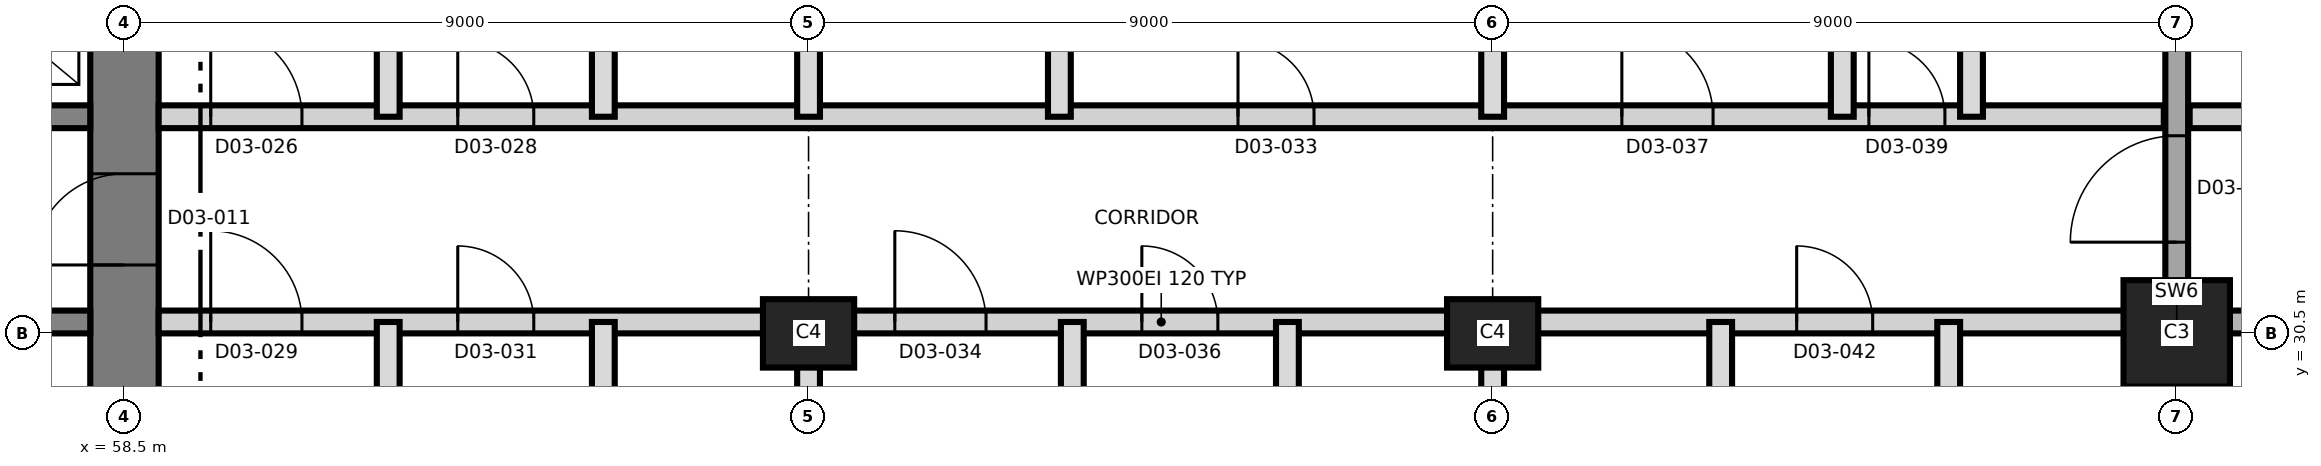
"""IFC4 building model, lengths in metres.
Left out: names, types, materials, properties, quantities, classifications, styles, units other than length and angle.
Written with IfcOpenShell. Run it as: python <this file> out.ifc"""

import sys

from ifc_helpers import new_model, si_unit, direction, frame, frame_2d, origin, origin_2d, place, context, subcontext, project, spatial, rectangle, extrude, element, fill, save


model = new_model("IFC4")
c1 = context("Model", 3, precision=1e-05, world=origin(), true_north=direction((0.0, 1.0)))
c2 = subcontext(c1, "Body", "Model", "MODEL_VIEW")
j1 = project(units=[si_unit("LENGTHUNIT", "METRE"), si_unit("PLANEANGLEUNIT", "RADIAN")], contexts=[c1])
p1 = place(None, origin())
s1 = spatial("IfcSite", under=j1, at=p1, CompositionType="ELEMENT")
p2 = place(p1, origin())
s2 = spatial("IfcBuilding", under=s1, at=p2, CompositionType="ELEMENT")
p3 = place(p2, frame((0.0, 0.0, 55.7)))
s3 = spatial("IfcBuildingStorey", under=s2, at=p3, CompositionType="ELEMENT", Elevation=55.7)
p4 = place(p3, frame((58.5, 21.05, 0.0), z_axis=(0.0, 0.0, 1.0), x_axis=(0.0, 1.0, 0.0)))
e1 = element("IfcWall", 1, at=p4, inside=s3, PredefinedType="SHEAR", context=c2, shape_type="SweptSolid", body=[
    extrude(rectangle(XDim=18.9, YDim=0.9, at=frame_2d((9.45, 0.0))), origin(), (0.0, 0.0, 1.0), 3.7),
])
p5 = place(p4, frame((10.35, 0.0, 0.0)))
e2 = element("IfcOpeningElement", 2, at=p5, cuts=e1, PredefinedType="OPENING", context=c2, shape_type="SweptSolid", body=[
    extrude(rectangle(XDim=1.2, YDim=2.1, at=frame_2d((0.6, 1.05))), frame((0.0, 0.46, 0.0), z_axis=(0.0, -1.0, 0.0), x_axis=(1.0, 0.0, 0.0)), (0.0, 0.0, 1.0), 0.92),
])
p6 = place(p3, frame((31.95, 30.65, 0.0), z_axis=(0.0, 0.0, 1.0), x_axis=(1.0, 0.0, 0.0)))
e3 = element("IfcWall", 3, at=p6, inside=s3, PredefinedType="SHEAR", context=c2, shape_type="SweptSolid", body=[
    extrude(rectangle(XDim=26.1, YDim=0.3, at=frame_2d((13.05, 0.0))), origin(), (0.0, 0.0, 1.0), 3.7),
])
p7 = place(p6, frame((24.55, 0.0, 0.0)))
e4 = element("IfcOpeningElement", 4, at=p7, cuts=e3, PredefinedType="OPENING", context=c2, shape_type="SweptSolid", body=[
    extrude(rectangle(XDim=1.0, YDim=2.1, at=frame_2d((0.5, 1.05))), frame((0.0, 0.16, 0.0), z_axis=(0.0, -1.0, 0.0), x_axis=(1.0, 0.0, 0.0)), (0.0, 0.0, 1.0), 0.32),
])
p8 = place(p6, frame((11.35, 0.0, 0.0)))
e5 = element("IfcOpeningElement", 5, at=p8, cuts=e3, PredefinedType="OPENING", context=c2, shape_type="SweptSolid", body=[
    extrude(rectangle(XDim=1.0, YDim=2.1, at=frame_2d((0.5, 1.05))), frame((0.0, 0.16, 0.0), z_axis=(0.0, -1.0, 0.0), x_axis=(1.0, 0.0, 0.0)), (0.0, 0.0, 1.0), 0.32),
])
p9 = place(p3, frame((31.95, 33.35, 0.0), z_axis=(0.0, 0.0, 1.0), x_axis=(1.0, 0.0, 0.0)))
e6 = element("IfcWall", 6, at=p9, inside=s3, PredefinedType="SHEAR", context=c2, shape_type="SweptSolid", body=[
    extrude(rectangle(XDim=26.1, YDim=0.3, at=frame_2d((13.05, 0.0))), origin(), (0.0, 0.0, 1.0), 3.7),
])
p10 = place(p9, frame((13.125, 0.0, 0.0)))
e7 = element("IfcOpeningElement", 7, at=p10, cuts=e6, PredefinedType="OPENING", context=c2, shape_type="SweptSolid", body=[
    extrude(rectangle(XDim=1.4, YDim=2.1, at=frame_2d((0.7, 1.05))), frame((0.0, 0.16, 0.0), z_axis=(0.0, -1.0, 0.0), x_axis=(1.0, 0.0, 0.0)), (0.0, 0.0, 1.0), 0.32),
])
p11 = place(p9, frame((5.175, 0.0, 0.0)))
e8 = element("IfcOpeningElement", 8, at=p11, cuts=e6, PredefinedType="OPENING", context=c2, shape_type="SweptSolid", body=[
    extrude(rectangle(XDim=1.2, YDim=2.1, at=frame_2d((0.6, 1.05))), frame((0.0, 0.16, 0.0), z_axis=(0.0, -1.0, 0.0), x_axis=(1.0, 0.0, 0.0)), (0.0, 0.0, 1.0), 0.32),
])
p12 = place(p9, frame((19.725, 0.0, 0.0)))
e9 = element("IfcOpeningElement", 9, at=p12, cuts=e6, PredefinedType="OPENING", context=c2, shape_type="SweptSolid", body=[
    extrude(rectangle(XDim=1.2, YDim=2.1, at=frame_2d((0.6, 1.05))), frame((0.0, 0.16, 0.0), z_axis=(0.0, -1.0, 0.0), x_axis=(1.0, 0.0, 0.0)), (0.0, 0.0, 1.0), 0.32),
])
for number, where, z_axis, x_axis in (
    (10, (67.5, 30.5, 0.0), (0.0, 0.0, 1.0), (1.0, 0.0, 0.0)),
    (11, (76.5, 30.5, 0.0), (0.0, 0.0, 1.0), (1.0, 0.0, 0.0)),
):
    element("IfcColumn", number, at=place(p3, frame(where, z_axis=z_axis, x_axis=x_axis)), inside=s3, PredefinedType="COLUMN", context=c2, shape_type="SweptSolid", body=[
        extrude(rectangle(XDim=1.2, YDim=0.9, at=origin_2d()), origin(), (0.0, 0.0, 1.0), 3.7),
    ])
p13 = place(p3, frame((85.5, 30.5, 0.0), z_axis=(0.0, 0.0, 1.0), x_axis=(1.0, 0.0, 0.0)))
e12 = element("IfcColumn", 12, at=p13, inside=s3, PredefinedType="COLUMN", context=c2, shape_type="SweptSolid", body=[
    extrude(rectangle(XDim=1.4, YDim=1.4, at=origin_2d()), origin(), (0.0, 0.0, 1.0), 3.7),
])
p14 = place(p3, frame((85.5, 19.705, 0.0), z_axis=(0.0, 0.0, 1.0), x_axis=(0.0, 1.0, 0.0)))
e13 = element("IfcWall", 13, at=p14, inside=s3, PredefinedType="SHEAR", context=c2, shape_type="SweptSolid", body=[
    extrude(rectangle(XDim=21.59, YDim=0.3, at=frame_2d((10.795, 0.0))), origin(), (0.0, 0.0, 1.0), 3.7),
])
p15 = place(p14, frame((11.995, 0.0, 0.0)))
e14 = element("IfcOpeningElement", 14, at=p15, cuts=e13, PredefinedType="OPENING", context=c2, shape_type="SweptSolid", body=[
    extrude(rectangle(XDim=1.4, YDim=2.1, at=frame_2d((0.7, 1.05))), frame((0.0, 0.16, 0.0), z_axis=(0.0, -1.0, 0.0), x_axis=(1.0, 0.0, 0.0)), (0.0, 0.0, 1.0), 0.32),
])
p16 = place(p3, frame((58.95, 30.65, 0.0), z_axis=(0.0, 0.0, 1.0), x_axis=(1.0, 0.0, 0.0)))
e15 = element("IfcWall", 15, at=p16, inside=s3, PredefinedType="PARTITIONING", context=c2, shape_type="SweptSolid", body=[
    extrude(rectangle(XDim=26.38, YDim=0.3, at=frame_2d((13.19, 0.0))), origin(), (0.0, 0.0, 1.0), 3.4),
])
p17 = place(p16, frame((0.685, 0.0, 0.0)))
e16 = element("IfcOpeningElement", 16, at=p17, cuts=e15, PredefinedType="OPENING", context=c2, shape_type="SweptSolid", body=[
    extrude(rectangle(XDim=1.2, YDim=2.1, at=frame_2d((0.6, 1.05))), frame((0.0, 0.16, 0.0), z_axis=(0.0, -1.0, 0.0), x_axis=(1.0, 0.0, 0.0)), (0.0, 0.0, 1.0), 0.32),
])
p18 = place(p16, frame((3.935, 0.0, 0.0)))
e17 = element("IfcOpeningElement", 17, at=p18, cuts=e15, PredefinedType="OPENING", context=c2, shape_type="SweptSolid", body=[
    extrude(rectangle(XDim=1.0, YDim=2.1, at=frame_2d((0.5, 1.05))), frame((0.0, 0.16, 0.0), z_axis=(0.0, -1.0, 0.0), x_axis=(1.0, 0.0, 0.0)), (0.0, 0.0, 1.0), 0.32),
])
p19 = place(p16, frame((9.685, 0.0, 0.0)))
e18 = element("IfcOpeningElement", 18, at=p19, cuts=e15, PredefinedType="OPENING", context=c2, shape_type="SweptSolid", body=[
    extrude(rectangle(XDim=1.2, YDim=2.1, at=frame_2d((0.6, 1.05))), frame((0.0, 0.16, 0.0), z_axis=(0.0, -1.0, 0.0), x_axis=(1.0, 0.0, 0.0)), (0.0, 0.0, 1.0), 0.32),
])
p20 = place(p16, frame((12.935, 0.0, 0.0)))
e19 = element("IfcOpeningElement", 19, at=p20, cuts=e15, PredefinedType="OPENING", context=c2, shape_type="SweptSolid", body=[
    extrude(rectangle(XDim=1.0, YDim=2.1, at=frame_2d((0.5, 1.05))), frame((0.0, 0.16, 0.0), z_axis=(0.0, -1.0, 0.0), x_axis=(1.0, 0.0, 0.0)), (0.0, 0.0, 1.0), 0.32),
])
p21 = place(p16, frame((21.55, 0.0, 0.0)))
e20 = element("IfcOpeningElement", 20, at=p21, cuts=e15, PredefinedType="OPENING", context=c2, shape_type="SweptSolid", body=[
    extrude(rectangle(XDim=1.0, YDim=2.4, at=frame_2d((0.5, 1.2))), frame((0.0, 0.16, 0.0), z_axis=(0.0, -1.0, 0.0), x_axis=(1.0, 0.0, 0.0)), (0.0, 0.0, 1.0), 0.32),
])
p22 = place(p3, frame((85.67, 30.65, 0.0), z_axis=(0.0, 0.0, 1.0), x_axis=(1.0, 0.0, 0.0)))
e21 = element("IfcWall", 21, at=p22, inside=s3, PredefinedType="SHEAR", context=c2, shape_type="SweptSolid", body=[
    extrude(rectangle(XDim=9.58, YDim=0.3, at=frame_2d((4.79, 0.0))), origin(), (0.0, 0.0, 1.0), 3.4),
])
p23 = place(p22, frame((2.08, 0.0, 0.0)))
e22 = element("IfcOpeningElement", 22, at=p23, cuts=e21, PredefinedType="OPENING", context=c2, shape_type="SweptSolid", body=[
    extrude(rectangle(XDim=1.2, YDim=2.1, at=frame_2d((0.6, 1.05))), frame((0.0, 0.16, 0.0), z_axis=(0.0, -1.0, 0.0), x_axis=(1.0, 0.0, 0.0)), (0.0, 0.0, 1.0), 0.32),
])
p24 = place(p22, frame((5.63, 0.0, 0.0)))
e23 = element("IfcOpeningElement", 23, at=p24, cuts=e21, PredefinedType="OPENING", context=c2, shape_type="SweptSolid", body=[
    extrude(rectangle(XDim=1.0, YDim=2.1, at=frame_2d((0.5, 1.05))), frame((0.0, 0.16, 0.0), z_axis=(0.0, -1.0, 0.0), x_axis=(1.0, 0.0, 0.0)), (0.0, 0.0, 1.0), 0.32),
])
p25 = place(p3, frame((58.95, 33.35, 0.0), z_axis=(0.0, 0.0, 1.0), x_axis=(1.0, 0.0, 0.0)))
e24 = element("IfcWall", 24, at=p25, inside=s3, PredefinedType="PARTITIONING", context=c2, shape_type="SweptSolid", body=[
    extrude(rectangle(XDim=26.38, YDim=0.3, at=frame_2d((13.19, 0.0))), origin(), (0.0, 0.0, 1.0), 3.4),
])
p26 = place(p25, frame((0.685, 0.0, 0.0)))
e25 = element("IfcOpeningElement", 25, at=p26, cuts=e24, PredefinedType="OPENING", context=c2, shape_type="SweptSolid", body=[
    extrude(rectangle(XDim=1.2, YDim=2.1, at=frame_2d((0.6, 1.05))), frame((0.0, 0.16, 0.0), z_axis=(0.0, -1.0, 0.0), x_axis=(1.0, 0.0, 0.0)), (0.0, 0.0, 1.0), 0.32),
])
p27 = place(p25, frame((3.935, 0.0, 0.0)))
e26 = element("IfcOpeningElement", 26, at=p27, cuts=e24, PredefinedType="OPENING", context=c2, shape_type="SweptSolid", body=[
    extrude(rectangle(XDim=1.0, YDim=2.1, at=frame_2d((0.5, 1.05))), frame((0.0, 0.16, 0.0), z_axis=(0.0, -1.0, 0.0), x_axis=(1.0, 0.0, 0.0)), (0.0, 0.0, 1.0), 0.32),
])
p28 = place(p25, frame((14.2, 0.0, 0.0)))
e27 = element("IfcOpeningElement", 27, at=p28, cuts=e24, PredefinedType="OPENING", context=c2, shape_type="SweptSolid", body=[
    extrude(rectangle(XDim=1.0, YDim=2.4, at=frame_2d((0.5, 1.2))), frame((0.0, 0.16, 0.0), z_axis=(0.0, -1.0, 0.0), x_axis=(1.0, 0.0, 0.0)), (0.0, 0.0, 1.0), 0.32),
])
p29 = place(p25, frame((19.25, 0.0, 0.0)))
e28 = element("IfcOpeningElement", 28, at=p29, cuts=e24, PredefinedType="OPENING", context=c2, shape_type="SweptSolid", body=[
    extrude(rectangle(XDim=1.2, YDim=2.1, at=frame_2d((0.6, 1.05))), frame((0.0, 0.16, 0.0), z_axis=(0.0, -1.0, 0.0), x_axis=(1.0, 0.0, 0.0)), (0.0, 0.0, 1.0), 0.32),
])
p30 = place(p25, frame((22.5, 0.0, 0.0)))
e29 = element("IfcOpeningElement", 29, at=p30, cuts=e24, PredefinedType="OPENING", context=c2, shape_type="SweptSolid", body=[
    extrude(rectangle(XDim=1.0, YDim=2.1, at=frame_2d((0.5, 1.05))), frame((0.0, 0.16, 0.0), z_axis=(0.0, -1.0, 0.0), x_axis=(1.0, 0.0, 0.0)), (0.0, 0.0, 1.0), 0.32),
])
p31 = place(p3, frame((85.67, 33.35, 0.0), z_axis=(0.0, 0.0, 1.0), x_axis=(1.0, 0.0, 0.0)))
e30 = element("IfcWall", 30, at=p31, inside=s3, PredefinedType="PARTITIONING", context=c2, shape_type="SweptSolid", body=[
    extrude(rectangle(XDim=9.58, YDim=0.3, at=frame_2d((4.79, 0.0))), origin(), (0.0, 0.0, 1.0), 3.4),
])
p32 = place(p31, frame((1.83, 0.0, 0.0)))
e31 = element("IfcOpeningElement", 31, at=p32, cuts=e30, PredefinedType="OPENING", context=c2, shape_type="SweptSolid", body=[
    extrude(rectangle(XDim=1.0, YDim=2.1, at=frame_2d((0.5, 1.05))), frame((0.0, 0.16, 0.0), z_axis=(0.0, -1.0, 0.0), x_axis=(1.0, 0.0, 0.0)), (0.0, 0.0, 1.0), 0.32),
])
p33 = place(p31, frame((5.63, 0.0, 0.0)))
e32 = element("IfcOpeningElement", 32, at=p33, cuts=e30, PredefinedType="OPENING", context=c2, shape_type="SweptSolid", body=[
    extrude(rectangle(XDim=1.0, YDim=2.1, at=frame_2d((0.5, 1.05))), frame((0.0, 0.16, 0.0), z_axis=(0.0, -1.0, 0.0), x_axis=(1.0, 0.0, 0.0)), (0.0, 0.0, 1.0), 0.32),
])
p34 = place(p3, frame((61.97, 19.705, 0.0), z_axis=(0.0, 0.0, 1.0), x_axis=(0.0, 1.0, 0.0)))
e33 = element("IfcWall", 33, at=p34, inside=s3, PredefinedType="PARTITIONING", context=c2, shape_type="SweptSolid", body=[
    extrude(rectangle(XDim=10.945, YDim=0.3, at=frame_2d((5.472, 0.0))), origin(), (0.0, 0.0, 1.0), 3.4),
])
p35 = place(p3, frame((61.97, 33.35, 0.0), z_axis=(0.0, 0.0, 1.0), x_axis=(0.0, 1.0, 0.0)))
e34 = element("IfcWall", 34, at=p35, inside=s3, PredefinedType="PARTITIONING", context=c2, shape_type="SweptSolid", body=[
    extrude(rectangle(XDim=8.125, YDim=0.3, at=frame_2d((4.062, 0.0))), origin(), (0.0, 0.0, 1.0), 3.4),
])
for number, where, z_axis, x_axis in (
    (35, (64.8, 27.45, 0.0), (0.0, 0.0, 1.0), (0.0, 1.0, 0.0)),
    (36, (64.8, 33.35, 0.0), (0.0, 0.0, 1.0), (0.0, 1.0, 0.0)),
):
    element("IfcWall", number, at=place(p3, frame(where, z_axis=z_axis, x_axis=x_axis)), inside=s3, PredefinedType="PARTITIONING", context=c2, shape_type="SweptSolid", body=[
        extrude(rectangle(XDim=3.2, YDim=0.3, at=frame_2d((1.6, 0.0))), origin(), (0.0, 0.0, 1.0), 3.4),
    ])
p36 = place(p3, frame((67.5, 19.705, 0.0), z_axis=(0.0, 0.0, 1.0), x_axis=(0.0, 1.0, 0.0)))
e37 = element("IfcWall", 37, at=p36, inside=s3, PredefinedType="PARTITIONING", context=c2, shape_type="SweptSolid", body=[
    extrude(rectangle(XDim=10.945, YDim=0.3, at=frame_2d((5.472, 0.0))), origin(), (0.0, 0.0, 1.0), 3.4),
])
p37 = place(p3, frame((67.5, 33.35, 0.0), z_axis=(0.0, 0.0, 1.0), x_axis=(0.0, 1.0, 0.0)))
e38 = element("IfcWall", 38, at=p37, inside=s3, PredefinedType="PARTITIONING", context=c2, shape_type="SweptSolid", body=[
    extrude(rectangle(XDim=8.125, YDim=0.3, at=frame_2d((4.062, 0.0))), origin(), (0.0, 0.0, 1.0), 3.4),
])
p38 = place(p3, frame((70.8, 33.35, 0.0), z_axis=(0.0, 0.0, 1.0), x_axis=(0.0, 1.0, 0.0)))
e39 = element("IfcWall", 39, at=p38, inside=s3, PredefinedType="PARTITIONING", context=c2, shape_type="SweptSolid", body=[
    extrude(rectangle(XDim=3.5, YDim=0.3, at=frame_2d((1.75, 0.0))), origin(), (0.0, 0.0, 1.0), 3.4),
])
p39 = place(p3, frame((70.97, 19.705, 0.0), z_axis=(0.0, 0.0, 1.0), x_axis=(0.0, 1.0, 0.0)))
e40 = element("IfcWall", 40, at=p39, inside=s3, PredefinedType="PARTITIONING", context=c2, shape_type="SweptSolid", body=[
    extrude(rectangle(XDim=10.945, YDim=0.3, at=frame_2d((5.472, 0.0))), origin(), (0.0, 0.0, 1.0), 3.4),
])
p40 = place(p3, frame((73.8, 27.45, 0.0), z_axis=(0.0, 0.0, 1.0), x_axis=(0.0, 1.0, 0.0)))
e41 = element("IfcWall", 41, at=p40, inside=s3, PredefinedType="PARTITIONING", context=c2, shape_type="SweptSolid", body=[
    extrude(rectangle(XDim=3.2, YDim=0.3, at=frame_2d((1.6, 0.0))), origin(), (0.0, 0.0, 1.0), 3.4),
])
p41 = place(p3, frame((76.5, 19.705, 0.0), z_axis=(0.0, 0.0, 1.0), x_axis=(0.0, 1.0, 0.0)))
e42 = element("IfcWall", 42, at=p41, inside=s3, PredefinedType="PARTITIONING", context=c2, shape_type="SweptSolid", body=[
    extrude(rectangle(XDim=10.945, YDim=0.3, at=frame_2d((5.472, 0.0))), origin(), (0.0, 0.0, 1.0), 3.4),
])
p42 = place(p3, frame((76.5, 33.35, 0.0), z_axis=(0.0, 0.0, 1.0), x_axis=(0.0, 1.0, 0.0)))
e43 = element("IfcWall", 43, at=p42, inside=s3, PredefinedType="PARTITIONING", context=c2, shape_type="SweptSolid", body=[
    extrude(rectangle(XDim=8.125, YDim=0.3, at=frame_2d((4.062, 0.0))), origin(), (0.0, 0.0, 1.0), 3.4),
])
p43 = place(p3, frame((79.5, 27.35, 0.0), z_axis=(0.0, 0.0, 1.0), x_axis=(0.0, 1.0, 0.0)))
e44 = element("IfcWall", 44, at=p43, inside=s3, PredefinedType="PARTITIONING", context=c2, shape_type="SweptSolid", body=[
    extrude(rectangle(XDim=3.3, YDim=0.3, at=frame_2d((1.65, 0.0))), origin(), (0.0, 0.0, 1.0), 3.4),
])
p44 = place(p3, frame((81.1, 33.35, 0.0), z_axis=(0.0, 0.0, 1.0), x_axis=(0.0, 1.0, 0.0)))
e45 = element("IfcWall", 45, at=p44, inside=s3, PredefinedType="PARTITIONING", context=c2, shape_type="SweptSolid", body=[
    extrude(rectangle(XDim=8.125, YDim=0.3, at=frame_2d((4.062, 0.0))), origin(), (0.0, 0.0, 1.0), 3.4),
])
p45 = place(p3, frame((82.5, 27.35, 0.0), z_axis=(0.0, 0.0, 1.0), x_axis=(0.0, 1.0, 0.0)))
e46 = element("IfcWall", 46, at=p45, inside=s3, PredefinedType="PARTITIONING", context=c2, shape_type="SweptSolid", body=[
    extrude(rectangle(XDim=3.3, YDim=0.3, at=frame_2d((1.65, 0.0))), origin(), (0.0, 0.0, 1.0), 3.4),
])
p46 = place(p3, frame((82.8, 33.35, 0.0), z_axis=(0.0, 0.0, 1.0), x_axis=(0.0, 1.0, 0.0)))
e47 = element("IfcWall", 47, at=p46, inside=s3, PredefinedType="PARTITIONING", context=c2, shape_type="SweptSolid", body=[
    extrude(rectangle(XDim=3.2, YDim=0.3, at=frame_2d((1.6, 0.0))), origin(), (0.0, 0.0, 1.0), 3.4),
])
p47 = place(p5, origin())
e48 = element("IfcDoor", 48, at=p47, inside=s3, OperationType="SINGLE_SWING_LEFT", PredefinedType="DOOR", context=c2, shape_type="SweptSolid", body=[
    extrude(rectangle(XDim=1.2, YDim=2.1, at=frame_2d((0.6, 1.05))), frame((0.0, 0.025, 0.0), z_axis=(0.0, -1.0, 0.0), x_axis=(1.0, 0.0, 0.0)), (0.0, 0.0, 1.0), 0.05),
])
fill(e2, e48)
p48 = place(p26, origin())
e49 = element("IfcDoor", 49, at=p48, inside=s3, OperationType="SINGLE_SWING_LEFT", PredefinedType="DOOR", context=c2, shape_type="SweptSolid", body=[
    extrude(rectangle(XDim=1.2, YDim=2.1, at=frame_2d((0.6, 1.05))), frame((0.0, 0.025, 0.0), z_axis=(0.0, -1.0, 0.0), x_axis=(1.0, 0.0, 0.0)), (0.0, 0.0, 1.0), 0.05),
])
fill(e25, e49)
p49 = place(p27, origin())
e50 = element("IfcDoor", 50, at=p49, inside=s3, OperationType="SINGLE_SWING_LEFT", PredefinedType="DOOR", context=c2, shape_type="SweptSolid", body=[
    extrude(rectangle(XDim=1.0, YDim=2.1, at=frame_2d((0.5, 1.05))), frame((0.0, 0.025, 0.0), z_axis=(0.0, -1.0, 0.0), x_axis=(1.0, 0.0, 0.0)), (0.0, 0.0, 1.0), 0.05),
])
fill(e26, e50)
p50 = place(p17, origin())
e51 = element("IfcDoor", 51, at=p50, inside=s3, OperationType="SINGLE_SWING_LEFT", PredefinedType="DOOR", context=c2, shape_type="SweptSolid", body=[
    extrude(rectangle(XDim=1.2, YDim=2.1, at=frame_2d((0.6, 1.05))), frame((0.0, 0.025, 0.0), z_axis=(0.0, -1.0, 0.0), x_axis=(1.0, 0.0, 0.0)), (0.0, 0.0, 1.0), 0.05),
])
fill(e16, e51)
p51 = place(p18, origin())
e52 = element("IfcDoor", 52, at=p51, inside=s3, OperationType="SINGLE_SWING_LEFT", PredefinedType="DOOR", context=c2, shape_type="SweptSolid", body=[
    extrude(rectangle(XDim=1.0, YDim=2.1, at=frame_2d((0.5, 1.05))), frame((0.0, 0.025, 0.0), z_axis=(0.0, -1.0, 0.0), x_axis=(1.0, 0.0, 0.0)), (0.0, 0.0, 1.0), 0.05),
])
fill(e17, e52)
p52 = place(p28, origin())
e53 = element("IfcDoor", 53, at=p52, inside=s3, OperationType="SINGLE_SWING_LEFT", PredefinedType="DOOR", context=c2, shape_type="SweptSolid", body=[
    extrude(rectangle(XDim=1.0, YDim=2.4, at=frame_2d((0.5, 1.2))), frame((0.0, 0.025, 0.0), z_axis=(0.0, -1.0, 0.0), x_axis=(1.0, 0.0, 0.0)), (0.0, 0.0, 1.0), 0.05),
])
fill(e27, e53)
p53 = place(p19, origin())
e54 = element("IfcDoor", 54, at=p53, inside=s3, OperationType="SINGLE_SWING_RIGHT", PredefinedType="DOOR", context=c2, shape_type="SweptSolid", body=[
    extrude(rectangle(XDim=1.2, YDim=2.1, at=frame_2d((0.6, 1.05))), frame((0.0, 0.025, 0.0), z_axis=(0.0, -1.0, 0.0), x_axis=(1.0, 0.0, 0.0)), (0.0, 0.0, 1.0), 0.05),
])
fill(e18, e54)
p54 = place(p20, origin())
e55 = element("IfcDoor", 55, at=p54, inside=s3, OperationType="SINGLE_SWING_LEFT", PredefinedType="DOOR", context=c2, shape_type="SweptSolid", body=[
    extrude(rectangle(XDim=1.0, YDim=2.1, at=frame_2d((0.5, 1.05))), frame((0.0, 0.025, 0.0), z_axis=(0.0, -1.0, 0.0), x_axis=(1.0, 0.0, 0.0)), (0.0, 0.0, 1.0), 0.05),
])
fill(e19, e55)
p55 = place(p29, origin())
e56 = element("IfcDoor", 56, at=p55, inside=s3, OperationType="SINGLE_SWING_RIGHT", PredefinedType="DOOR", context=c2, shape_type="SweptSolid", body=[
    extrude(rectangle(XDim=1.2, YDim=2.1, at=frame_2d((0.6, 1.05))), frame((0.0, 0.025, 0.0), z_axis=(0.0, -1.0, 0.0), x_axis=(1.0, 0.0, 0.0)), (0.0, 0.0, 1.0), 0.05),
])
fill(e28, e56)
p56 = place(p30, origin())
e57 = element("IfcDoor", 57, at=p56, inside=s3, OperationType="SINGLE_SWING_LEFT", PredefinedType="DOOR", context=c2, shape_type="SweptSolid", body=[
    extrude(rectangle(XDim=1.0, YDim=2.1, at=frame_2d((0.5, 1.05))), frame((0.0, 0.025, 0.0), z_axis=(0.0, -1.0, 0.0), x_axis=(1.0, 0.0, 0.0)), (0.0, 0.0, 1.0), 0.05),
])
fill(e29, e57)
p57 = place(p21, origin())
e58 = element("IfcDoor", 58, at=p57, inside=s3, OperationType="SINGLE_SWING_RIGHT", PredefinedType="DOOR", context=c2, shape_type="SweptSolid", body=[
    extrude(rectangle(XDim=1.0, YDim=2.4, at=frame_2d((0.5, 1.2))), frame((0.0, 0.025, 0.0), z_axis=(0.0, -1.0, 0.0), x_axis=(1.0, 0.0, 0.0)), (0.0, 0.0, 1.0), 0.05),
])
fill(e20, e58)
p58 = place(p15, origin())
e59 = element("IfcDoor", 59, at=p58, inside=s3, OperationType="SINGLE_SWING_RIGHT", PredefinedType="DOOR", context=c2, shape_type="SweptSolid", body=[
    extrude(rectangle(XDim=1.4, YDim=2.1, at=frame_2d((0.7, 1.05))), frame((0.0, 0.025, 0.0), z_axis=(0.0, -1.0, 0.0), x_axis=(1.0, 0.0, 0.0)), (0.0, 0.0, 1.0), 0.05),
])
fill(e14, e59)
save(model, sys.argv[1])
